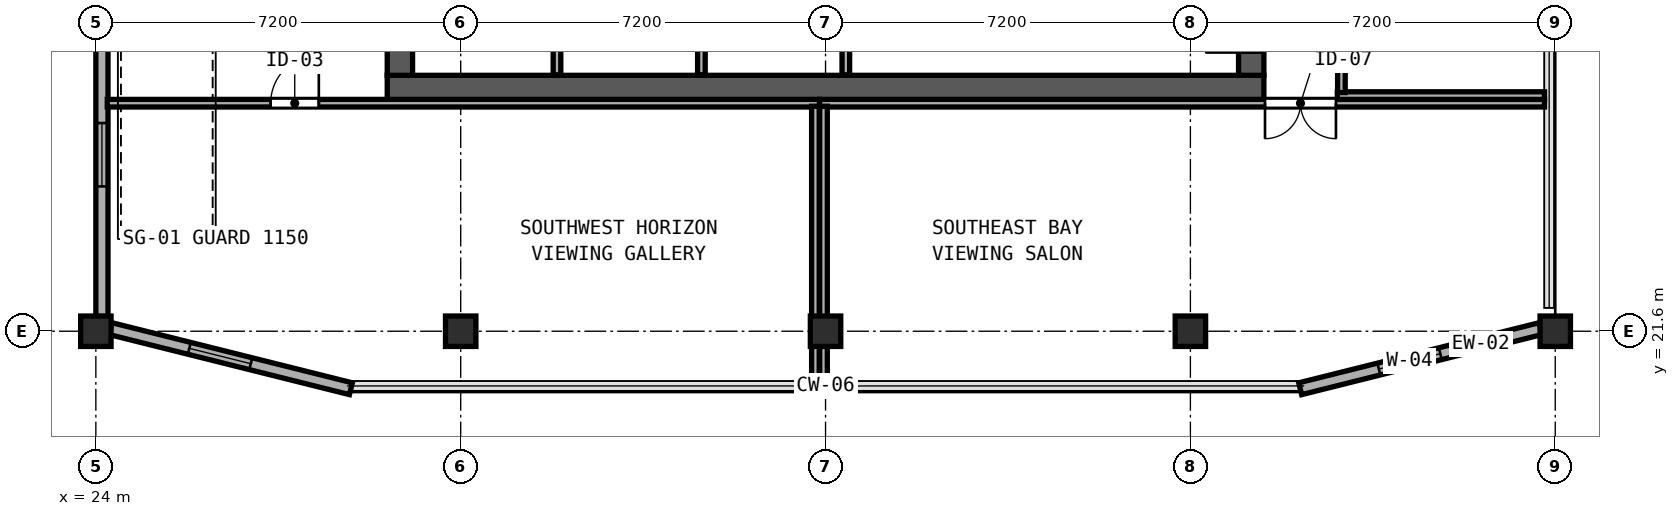
"""IFC4 building model, lengths in metres.
Left out: names, types, materials, properties, quantities, classifications, styles, units other than length and angle.
Written with IfcOpenShell. Run it as: python <this file> out.ifc"""

import sys

from ifc_helpers import new_model, si_unit, direction, frame, frame_2d, origin, origin_2d, place, context, subcontext, project, spatial, rectangle, hollow_rectangle, extrude, element, fill, save


model = new_model("IFC4")
c1 = context("Model", 3, precision=1e-05, world=origin(), true_north=direction((0.0, 1.0)))
c2 = subcontext(c1, "Body", "Model", "MODEL_VIEW")
j1 = project(units=[si_unit("LENGTHUNIT", "METRE"), si_unit("PLANEANGLEUNIT", "RADIAN")], contexts=[c1])
p1 = place(None, origin())
s1 = spatial("IfcSite", under=j1, at=p1, CompositionType="ELEMENT")
p2 = place(p1, origin())
s2 = spatial("IfcBuilding", under=s1, at=p2, CompositionType="ELEMENT")
p3 = place(p2, frame((0.0, 0.0, 323.2)))
s3 = spatial("IfcBuildingStorey", under=s2, at=p3, CompositionType="ELEMENT", Elevation=323.2)
p4 = place(p3, frame((29.75, 26.4, 0.0), z_axis=(0.0, 0.0, 1.0), x_axis=(1.0, 0.0, 0.0)))
e1 = element("IfcWall", 1, at=p4, inside=s3, PredefinedType="SHEAR", context=c2, shape_type="SweptSolid", body=[
    extrude(rectangle(XDim=17.3, YDim=0.5, at=frame_2d((8.65, 0.0))), origin(), (0.0, 0.0, 1.0), 4.75),
])
p5 = place(p3, frame((30.0, 26.65, 0.0), z_axis=(0.0, 0.0, 1.0), x_axis=(0.0, 1.0, 0.0)))
e2 = element("IfcWall", 2, at=p5, inside=s3, PredefinedType="SHEAR", context=c2, shape_type="SweptSolid", body=[
    extrude(rectangle(XDim=4.2, YDim=0.5, at=frame_2d((2.1, 0.0))), origin(), (0.0, 0.0, 1.0), 4.75),
])
p6 = place(p3, frame((46.8, 26.65, 0.0), z_axis=(0.0, 0.0, 1.0), x_axis=(0.0, 1.0, 0.0)))
e3 = element("IfcWall", 3, at=p6, inside=s3, PredefinedType="SHEAR", context=c2, shape_type="SweptSolid", body=[
    extrude(rectangle(XDim=4.2, YDim=0.5, at=frame_2d((2.1, 0.0))), origin(), (0.0, 0.0, 1.0), 4.75),
])
p7 = place(p6, frame((1.35, 0.0, 0.0), z_axis=(0.0, 0.0, 1.0), x_axis=(-1.0, 0.0, 0.0)))
e4 = element("IfcOpeningElement", 4, at=p7, cuts=e3, PredefinedType="OPENING", context=c2, shape_type="SweptSolid", body=[
    extrude(rectangle(XDim=0.9, YDim=2.1, at=frame_2d((0.45, 1.05))), frame((0.0, 0.26, 0.0), z_axis=(0.0, -1.0, 0.0), x_axis=(1.0, 0.0, 0.0)), (0.0, 0.0, 1.0), 0.52),
])
for number, where, z_axis, x_axis in (
    (5, (24.0, 21.6, 0.0), (0.0, 0.0, 1.0), (1.0, 0.0, 0.0)),
    (6, (52.8, 21.6, 0.0), (0.0, 0.0, 1.0), (1.0, 0.0, 0.0)),
    (7, (31.2, 21.6, 0.0), (0.0, 0.0, 1.0), (1.0, 0.0, 0.0)),
    (8, (45.6, 21.6, 0.0), (0.0, 0.0, 1.0), (1.0, 0.0, 0.0)),
    (9, (38.4, 21.6, 0.0), (0.0, 0.0, 1.0), (1.0, 0.0, 0.0)),
):
    element("IfcColumn", number, at=place(p3, frame(where, z_axis=z_axis, x_axis=x_axis)), inside=s3, PredefinedType="COLUMN", context=c2, shape_type="SweptSolid", body=[
        extrude(hollow_rectangle(XDim=0.6, YDim=0.6, WallThickness=0.024, at=origin_2d()), origin(), (0.0, 0.0, 1.0), 5.0),
    ])
p8 = place(p3, frame((47.767, 20.465, 0.0), z_axis=(0.0, 0.0, 1.0), x_axis=(0.970142500145, 0.242535625036, 0.0)))
e10 = element("IfcWall", 10, at=p8, inside=s3, PredefinedType="SOLIDWALL", context=c2, shape_type="SweptSolid", body=[
    extrude(rectangle(XDim=4.887, YDim=0.24, at=frame_2d((2.444, 0.0))), origin(), (0.0, 0.0, 1.0), 4.75),
])
p9 = place(p8, frame((1.6, 0.0, 0.85)))
e11 = element("IfcOpeningElement", 11, at=p9, cuts=e10, PredefinedType="OPENING", context=c2, shape_type="SweptSolid", body=[
    extrude(rectangle(XDim=1.25, YDim=1.95, at=frame_2d((0.625, 0.975))), frame((0.0, 0.13, 0.0), z_axis=(0.0, -1.0, 0.0), x_axis=(1.0, 0.0, 0.0)), (0.0, 0.0, 1.0), 0.26),
])
p10 = place(p3, frame((24.12, 27.308, 0.0), z_axis=(0.0, 0.0, 1.0), x_axis=(0.0, -1.0, 0.0)))
e12 = element("IfcWall", 12, at=p10, inside=s3, PredefinedType="SOLIDWALL", context=c2, shape_type="SweptSolid", body=[
    extrude(rectangle(XDim=5.416, YDim=0.24, at=frame_2d((2.708, 0.0))), origin(), (0.0, 0.0, 1.0), 4.75),
])
p11 = place(p10, frame((1.6, 0.0, 0.85)))
e13 = element("IfcOpeningElement", 13, at=p11, cuts=e12, PredefinedType="OPENING", context=c2, shape_type="SweptSolid", body=[
    extrude(rectangle(XDim=1.25, YDim=1.95, at=frame_2d((0.625, 0.975))), frame((0.0, 0.13, 0.0), z_axis=(0.0, -1.0, 0.0), x_axis=(1.0, 0.0, 0.0)), (0.0, 0.0, 1.0), 0.26),
])
p12 = place(p3, frame((24.292, 21.651, 0.0), z_axis=(0.0, 0.0, 1.0), x_axis=(0.970142500145, -0.242535625036, 0.0)))
e14 = element("IfcWall", 14, at=p12, inside=s3, PredefinedType="SOLIDWALL", context=c2, shape_type="SweptSolid", body=[
    extrude(rectangle(XDim=4.887, YDim=0.24, at=frame_2d((2.444, 0.0))), origin(), (0.0, 0.0, 1.0), 4.75),
])
p13 = place(p12, frame((1.6, 0.0, 0.85)))
e15 = element("IfcOpeningElement", 15, at=p13, cuts=e14, PredefinedType="OPENING", context=c2, shape_type="SweptSolid", body=[
    extrude(rectangle(XDim=1.25, YDim=1.95, at=frame_2d((0.625, 0.975))), frame((0.0, 0.13, 0.0), z_axis=(0.0, -1.0, 0.0), x_axis=(1.0, 0.0, 0.0)), (0.0, 0.0, 1.0), 0.26),
])
p14 = place(p3, frame((38.8, 26.66, 0.0), z_axis=(0.0, 0.0, 1.0), x_axis=(0.0, 1.0, 0.0)))
e16 = element("IfcWall", 16, at=p14, inside=s3, PredefinedType="SOLIDWALL", context=c2, shape_type="SweptSolid", body=[
    extrude(rectangle(XDim=4.075, YDim=0.15, at=frame_2d((2.038, 0.0))), origin(), (0.0, 0.0, 1.0), 4.75),
])
for number, where, z_axis, x_axis in (
    (17, (33.1, 26.66, 0.0), (0.0, 0.0, 1.0), (0.0, 1.0, 0.0)),
    (18, (35.95, 26.66, 0.0), (0.0, 0.0, 1.0), (0.0, 1.0, 0.0)),
):
    element("IfcWall", number, at=place(p3, frame(where, z_axis=z_axis, x_axis=x_axis)), inside=s3, PredefinedType="PARTITIONING", context=c2, shape_type="SweptSolid", body=[
        extrude(rectangle(XDim=4.075, YDim=0.15, at=frame_2d((2.038, 0.0))), origin(), (0.0, 0.0, 1.0), 4.75),
    ])
p15 = place(p3, frame((24.225, 26.1, 0.0), z_axis=(0.0, 0.0, 1.0), x_axis=(1.0, 0.0, 0.0)))
e19 = element("IfcWall", 19, at=p15, inside=s3, PredefinedType="PARTITIONING", context=c2, shape_type="SweptSolid", body=[
    extrude(rectangle(XDim=14.055, YDim=0.15, at=frame_2d((7.027, 0.0))), origin(), (0.0, 0.0, 1.0), 4.75),
])
p16 = place(p15, frame((4.175, 0.0, 0.0), z_axis=(0.0, 0.0, 1.0), x_axis=(-1.0, 0.0, 0.0)))
e20 = element("IfcOpeningElement", 20, at=p16, cuts=e19, PredefinedType="OPENING", context=c2, shape_type="SweptSolid", body=[
    extrude(rectangle(XDim=0.95, YDim=2.12, at=frame_2d((0.475, 1.06))), frame((0.0, 0.085, 0.0), z_axis=(0.0, -1.0, 0.0), x_axis=(1.0, 0.0, 0.0)), (0.0, 0.0, 1.0), 0.17),
])
p17 = place(p3, frame((38.2, 20.612, 0.0), z_axis=(0.0, 0.0, 1.0), x_axis=(0.0, 1.0, 0.0)))
e21 = element("IfcWall", 21, at=p17, inside=s3, PredefinedType="PARTITIONING", context=c2, shape_type="SweptSolid", body=[
    extrude(rectangle(XDim=5.428, YDim=0.15, at=frame_2d((2.714, 0.0))), origin(), (0.0, 0.0, 1.0), 4.035),
])
p18 = place(p3, frame((38.282, 26.1, 0.0), z_axis=(0.0, 0.0, 1.0), x_axis=(1.0, 0.0, 0.0)))
e22 = element("IfcWall", 22, at=p18, inside=s3, PredefinedType="PARTITIONING", context=c2, shape_type="SweptSolid", body=[
    extrude(rectangle(XDim=14.306, YDim=0.15, at=frame_2d((7.153, 0.0))), origin(), (0.0, 0.0, 1.0), 4.75),
])
p19 = place(p18, frame((10.19, 0.0, 0.0), z_axis=(0.0, 0.0, 1.0), x_axis=(-1.0, 0.0, 0.0)))
e23 = element("IfcOpeningElement", 23, at=p19, cuts=e22, PredefinedType="OPENING", context=c2, shape_type="SweptSolid", body=[
    extrude(rectangle(XDim=1.4, YDim=2.18, at=frame_2d((0.7, 1.09))), frame((0.0, 0.085, 0.0), z_axis=(0.0, -1.0, 0.0), x_axis=(1.0, 0.0, 0.0)), (0.0, 0.0, 1.0), 0.17),
])
p20 = place(p3, frame((38.36, 20.612, 0.0), z_axis=(0.0, 0.0, 1.0), x_axis=(0.0, 1.0, 0.0)))
e24 = element("IfcWall", 24, at=p20, inside=s3, PredefinedType="PARTITIONING", context=c2, shape_type="SweptSolid", body=[
    extrude(rectangle(XDim=5.428, YDim=0.15, at=frame_2d((2.714, 0.0))), origin(), (0.0, 0.0, 1.0), 4.035),
])
p21 = place(p3, frame((48.5, 26.25, 0.0), z_axis=(0.0, 0.0, 1.0), x_axis=(1.0, 0.0, 0.0)))
e25 = element("IfcWall", 25, at=p21, inside=s3, PredefinedType="PARTITIONING", context=c2, shape_type="SweptSolid", body=[
    extrude(rectangle(XDim=4.088, YDim=0.15, at=frame_2d((2.044, 0.0))), origin(), (0.0, 0.0, 1.0), 4.75),
])
p22 = place(p3, frame((48.58, 26.31, 0.0), z_axis=(0.0, 0.0, 1.0), x_axis=(0.0, 1.0, 0.0)))
e26 = element("IfcWall", 26, at=p22, inside=s3, PredefinedType="PARTITIONING", context=c2, shape_type="SweptSolid", body=[
    extrude(rectangle(XDim=6.87, YDim=0.15, at=frame_2d((3.435, 0.0))), origin(), (0.0, 0.0, 1.0), 4.75),
])
p23 = place(p22, frame((2.26, 0.0, 0.0)))
e27 = element("IfcOpeningElement", 27, at=p23, cuts=e26, PredefinedType="OPENING", context=c2, shape_type="SweptSolid", body=[
    extrude(rectangle(XDim=0.95, YDim=2.12, at=frame_2d((0.475, 1.06))), frame((0.0, 0.085, 0.0), z_axis=(0.0, -1.0, 0.0), x_axis=(1.0, 0.0, 0.0)), (0.0, 0.0, 1.0), 0.17),
])
p24 = place(p9, origin())
e28 = element("IfcWindow", 28, at=p24, inside=s3, PartitioningType="SINGLE_PANEL", PredefinedType="WINDOW", context=c2, shape_type="SweptSolid", body=[
    extrude(rectangle(XDim=1.25, YDim=1.95, at=frame_2d((0.625, 0.975))), frame((0.0, 0.03, 0.0), z_axis=(0.0, -1.0, 0.0), x_axis=(1.0, 0.0, 0.0)), (0.0, 0.0, 1.0), 0.06),
])
fill(e11, e28)
p25 = place(p11, origin())
e29 = element("IfcWindow", 29, at=p25, inside=s3, PartitioningType="SINGLE_PANEL", PredefinedType="WINDOW", context=c2, shape_type="SweptSolid", body=[
    extrude(rectangle(XDim=1.25, YDim=1.95, at=frame_2d((0.625, 0.975))), frame((0.0, 0.03, 0.0), z_axis=(0.0, -1.0, 0.0), x_axis=(1.0, 0.0, 0.0)), (0.0, 0.0, 1.0), 0.06),
])
fill(e13, e29)
p26 = place(p13, origin())
e30 = element("IfcWindow", 30, at=p26, inside=s3, PartitioningType="SINGLE_PANEL", PredefinedType="WINDOW", context=c2, shape_type="SweptSolid", body=[
    extrude(rectangle(XDim=1.25, YDim=1.95, at=frame_2d((0.625, 0.975))), frame((0.0, 0.03, 0.0), z_axis=(0.0, -1.0, 0.0), x_axis=(1.0, 0.0, 0.0)), (0.0, 0.0, 1.0), 0.06),
])
fill(e15, e30)
p27 = place(p7, origin())
e31 = element("IfcDoor", 31, at=p27, inside=s3, OperationType="SINGLE_SWING_RIGHT", PredefinedType="DOOR", context=c2, shape_type="SweptSolid", body=[
    extrude(rectangle(XDim=0.9, YDim=2.1, at=frame_2d((0.45, 1.05))), frame((0.0, -0.135, 0.0), z_axis=(0.0, -1.0, 0.0), x_axis=(1.0, 0.0, 0.0)), (0.0, 0.0, 1.0), 0.05),
])
fill(e4, e31)
p28 = place(p16, origin())
e32 = element("IfcDoor", 32, at=p28, inside=s3, OperationType="SINGLE_SWING_LEFT", PredefinedType="DOOR", context=c2, shape_type="SweptSolid", body=[
    extrude(rectangle(XDim=0.95, YDim=2.12, at=frame_2d((0.475, 1.06))), frame((0.0, 0.025, 0.0), z_axis=(0.0, -1.0, 0.0), x_axis=(1.0, 0.0, 0.0)), (0.0, 0.0, 1.0), 0.05),
])
fill(e20, e32)
p29 = place(p19, origin())
e33 = element("IfcDoor", 33, at=p29, inside=s3, OperationType="DOUBLE_DOOR_SINGLE_SWING", PredefinedType="DOOR", context=c2, shape_type="SweptSolid", body=[
    extrude(rectangle(XDim=1.4, YDim=2.18, at=frame_2d((0.7, 1.09))), frame((0.0, 0.025, 0.0), z_axis=(0.0, -1.0, 0.0), x_axis=(1.0, 0.0, 0.0)), (0.0, 0.0, 1.0), 0.05),
])
fill(e23, e33)
save(model, sys.argv[1])
